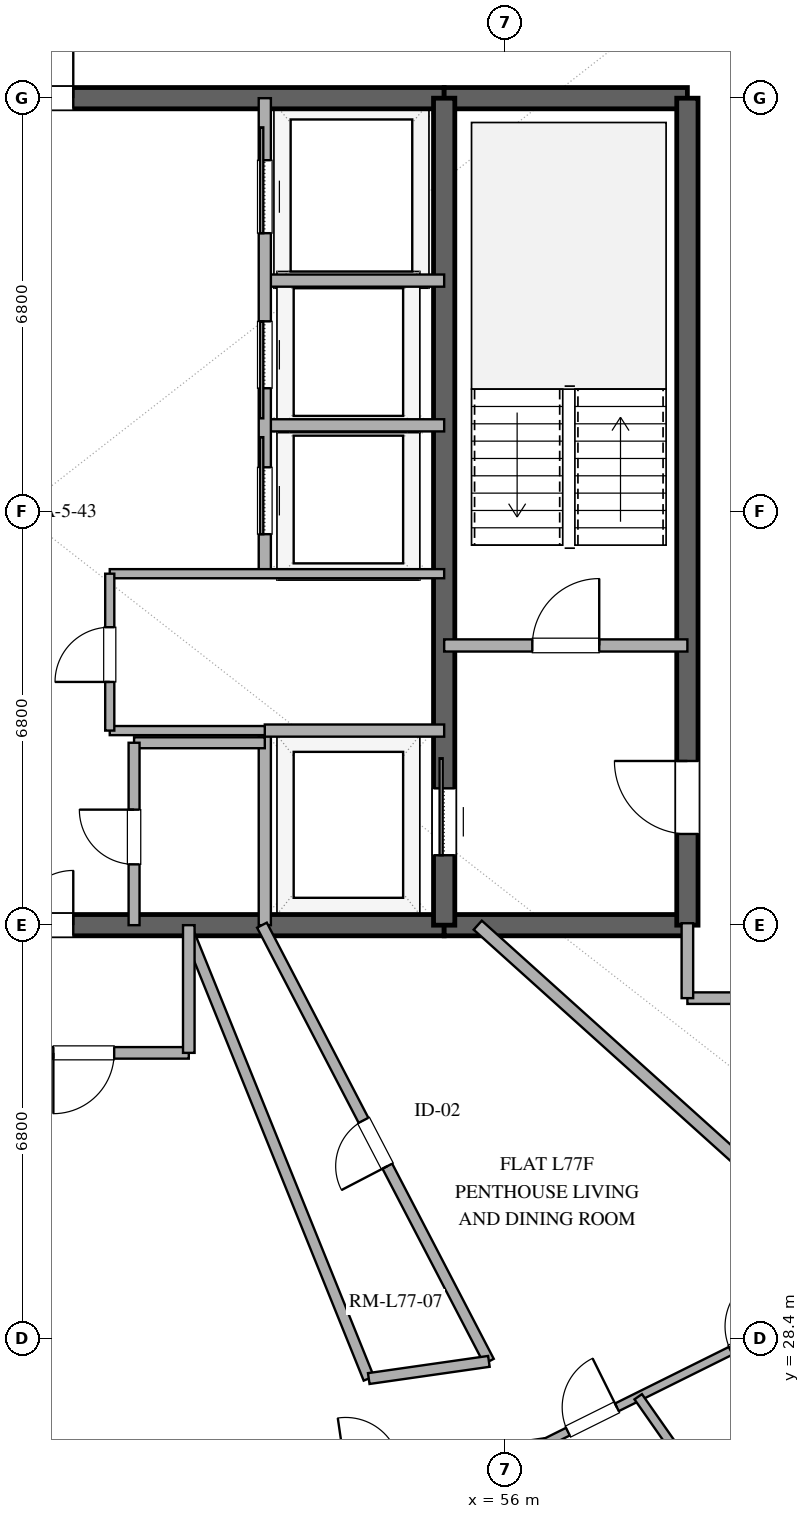
"""IFC4 building model, lengths in metres.
Left out: names, types, materials, properties, quantities, classifications, styles, units other than length and angle.
Written with IfcOpenShell. Run it as: python <this file> out.ifc"""

import sys

from ifc_helpers import new_model, si_unit, direction, frame, frame_2d, origin, place, context, subcontext, project, spatial, rectangle, extrude, element, fill, save


model = new_model("IFC4")
c1 = context("Model", 3, precision=1e-05, world=origin(), true_north=direction((0.0, 1.0)))
c2 = subcontext(c1, "Body", "Model", "MODEL_VIEW")
j1 = project(units=[si_unit("LENGTHUNIT", "METRE"), si_unit("PLANEANGLEUNIT", "RADIAN")], contexts=[c1])
p1 = place(None, origin())
s1 = spatial("IfcSite", under=j1, at=p1, CompositionType="ELEMENT")
p2 = place(p1, origin())
s2 = spatial("IfcBuilding", under=s1, at=p2, CompositionType="ELEMENT")
p3 = place(p2, frame((0.0, 0.0, 298.2)))
s3 = spatial("IfcBuildingStorey", under=s2, at=p3, CompositionType="ELEMENT", Elevation=298.2)
p4 = place(p3, frame((41.0, 35.2, 0.0), z_axis=(0.0, 0.0, 1.0), x_axis=(1.0, 0.0, 0.0)))
e1 = element("IfcWall", 1, at=p4, inside=s3, PredefinedType="SHEAR", context=c2, shape_type="SweptSolid", body=[
    extrude(rectangle(XDim=14.0, YDim=0.35, at=frame_2d((7.0, 0.0))), origin(), (0.0, 0.0, 1.0), 3.37),
])
p5 = place(p4, frame((6.1, 0.0, 0.0)))
e2 = element("IfcOpeningElement", 2, at=p5, cuts=e1, PredefinedType="OPENING", context=c2, shape_type="SweptSolid", body=[
    extrude(rectangle(XDim=1.8, YDim=2.25, at=frame_2d((0.9, 1.125))), frame((0.0, 0.185, 0.0), z_axis=(0.0, -1.0, 0.0), x_axis=(1.0, 0.0, 0.0)), (0.0, 0.0, 1.0), 0.37),
])
p6 = place(p3, frame((55.0, 35.2, 0.0), z_axis=(0.0, 0.0, 1.0), x_axis=(1.0, 0.0, 0.0)))
e3 = element("IfcWall", 3, at=p6, inside=s3, PredefinedType="SHEAR", context=c2, shape_type="SweptSolid", body=[
    extrude(rectangle(XDim=4.0, YDim=0.35, at=frame_2d((2.0, 0.0))), origin(), (0.0, 0.0, 1.0), 3.37),
])
p7 = place(p3, frame((41.0, 48.8, 0.0), z_axis=(0.0, 0.0, 1.0), x_axis=(1.0, 0.0, 0.0)))
e4 = element("IfcWall", 4, at=p7, inside=s3, PredefinedType="SHEAR", context=c2, shape_type="SweptSolid", body=[
    extrude(rectangle(XDim=14.0, YDim=0.35, at=frame_2d((7.0, 0.0))), origin(), (0.0, 0.0, 1.0), 3.37),
])
p8 = place(p7, frame((6.1, 0.0, 0.0)))
e5 = element("IfcOpeningElement", 5, at=p8, cuts=e4, PredefinedType="OPENING", context=c2, shape_type="SweptSolid", body=[
    extrude(rectangle(XDim=1.8, YDim=2.25, at=frame_2d((0.9, 1.125))), frame((0.0, 0.185, 0.0), z_axis=(0.0, -1.0, 0.0), x_axis=(1.0, 0.0, 0.0)), (0.0, 0.0, 1.0), 0.37),
])
p9 = place(p3, frame((55.0, 48.8, 0.0), z_axis=(0.0, 0.0, 1.0), x_axis=(1.0, 0.0, 0.0)))
e6 = element("IfcWall", 6, at=p9, inside=s3, PredefinedType="SHEAR", context=c2, shape_type="SweptSolid", body=[
    extrude(rectangle(XDim=4.0, YDim=0.35, at=frame_2d((2.0, 0.0))), origin(), (0.0, 0.0, 1.0), 3.37),
])
p10 = place(p3, frame((59.0, 35.2, 0.0), z_axis=(0.0, 0.0, 1.0), x_axis=(0.0, 1.0, 0.0)))
e7 = element("IfcWall", 7, at=p10, inside=s3, PredefinedType="SHEAR", context=c2, shape_type="SweptSolid", body=[
    extrude(rectangle(XDim=13.6, YDim=0.35, at=frame_2d((6.8, 0.0))), origin(), (0.0, 0.0, 1.0), 3.37),
])
p11 = place(p10, frame((1.5, 0.0, 0.0)))
e8 = element("IfcOpeningElement", 8, at=p11, cuts=e7, PredefinedType="OPENING", context=c2, shape_type="SweptSolid", body=[
    extrude(rectangle(XDim=1.2, YDim=2.15, at=frame_2d((0.6, 1.075))), frame((0.0, 0.185, 0.0), z_axis=(0.0, -1.0, 0.0), x_axis=(1.0, 0.0, 0.0)), (0.0, 0.0, 1.0), 0.37),
])
p12 = place(p3, frame((55.0, 35.2, 0.0), z_axis=(0.0, 0.0, 1.0), x_axis=(0.0, 1.0, 0.0)))
e9 = element("IfcWall", 9, at=p12, inside=s3, PredefinedType="SHEAR", context=c2, shape_type="SweptSolid", body=[
    extrude(rectangle(XDim=13.6, YDim=0.35, at=frame_2d((6.8, 0.0))), origin(), (0.0, 0.0, 1.0), 3.37),
])
p13 = place(p12, frame((1.15, 0.0, 0.0)))
e10 = element("IfcOpeningElement", 10, at=p13, cuts=e9, PredefinedType="OPENING", context=c2, shape_type="SweptSolid", body=[
    extrude(rectangle(XDim=1.1, YDim=2.2, at=frame_2d((0.55, 1.1))), frame((0.0, 0.185, 0.0), z_axis=(0.0, -1.0, 0.0), x_axis=(1.0, 0.0, 0.0)), (0.0, 0.0, 1.0), 0.37),
])
p14 = place(p3, frame((55.0, 39.8, 0.0), z_axis=(0.0, 0.0, 1.0), x_axis=(1.0, 0.0, 0.0)))
e11 = element("IfcWall", 11, at=p14, inside=s3, PredefinedType="SOLIDWALL", context=c2, shape_type="SweptSolid", body=[
    extrude(rectangle(XDim=4.0, YDim=0.2, at=frame_2d((2.0, 0.0))), origin(), (0.0, 0.0, 1.0), 2.73),
])
p15 = place(p14, frame((1.45, 0.0, 0.0)))
e12 = element("IfcOpeningElement", 12, at=p15, cuts=e11, PredefinedType="OPENING", context=c2, shape_type="SweptSolid", body=[
    extrude(rectangle(XDim=1.1, YDim=2.15, at=frame_2d((0.55, 1.075))), frame((0.0, 0.11, 0.0), z_axis=(0.0, -1.0, 0.0), x_axis=(1.0, 0.0, 0.0)), (0.0, 0.0, 1.0), 0.22),
])
p16 = place(p3, frame((52.05, 35.2, 0.0), z_axis=(0.0, 0.0, 1.0), x_axis=(0.0, 1.0, 0.0)))
e13 = element("IfcWall", 13, at=p16, inside=s3, PredefinedType="SOLIDWALL", context=c2, shape_type="SweptSolid", body=[
    extrude(rectangle(XDim=3.2, YDim=0.2, at=frame_2d((1.6, 0.0))), origin(), (0.0, 0.0, 1.0), 2.73),
])
for number, where, z_axis, x_axis in (
    (14, (52.05, 38.4, 0.0), (0.0, 0.0, 1.0), (1.0, 0.0, 0.0)),
    (15, (52.05, 43.42, 0.0), (0.0, 0.0, 1.0), (1.0, 0.0, 0.0)),
    (16, (52.05, 45.8, 0.0), (0.0, 0.0, 1.0), (1.0, 0.0, 0.0)),
):
    element("IfcWall", number, at=place(p3, frame(where, z_axis=z_axis, x_axis=x_axis)), inside=s3, PredefinedType="SOLIDWALL", context=c2, shape_type="SweptSolid", body=[
        extrude(rectangle(XDim=2.95, YDim=0.2, at=frame_2d((1.475, 0.0))), origin(), (0.0, 0.0, 1.0), 2.73),
    ])
p17 = place(p3, frame((52.05, 40.98, 0.0), z_axis=(0.0, 0.0, 1.0), x_axis=(0.0, 1.0, 0.0)))
e17 = element("IfcWall", 17, at=p17, inside=s3, PredefinedType="SOLIDWALL", context=c2, shape_type="SweptSolid", body=[
    extrude(rectangle(XDim=7.82, YDim=0.2, at=frame_2d((3.91, 0.0))), origin(), (0.0, 0.0, 1.0), 2.73),
])
p18 = place(p17, frame((0.65, 0.0, 0.0)))
e18 = element("IfcOpeningElement", 18, at=p18, cuts=e17, PredefinedType="OPENING", context=c2, shape_type="SweptSolid", body=[
    extrude(rectangle(XDim=1.1, YDim=2.2, at=frame_2d((0.55, 1.1))), frame((0.0, 0.11, 0.0), z_axis=(0.0, -1.0, 0.0), x_axis=(1.0, 0.0, 0.0)), (0.0, 0.0, 1.0), 0.22),
])
p19 = place(p17, frame((3.05, 0.0, 0.0)))
e19 = element("IfcOpeningElement", 19, at=p19, cuts=e17, PredefinedType="OPENING", context=c2, shape_type="SweptSolid", body=[
    extrude(rectangle(XDim=1.1, YDim=2.2, at=frame_2d((0.55, 1.1))), frame((0.0, 0.11, 0.0), z_axis=(0.0, -1.0, 0.0), x_axis=(1.0, 0.0, 0.0)), (0.0, 0.0, 1.0), 0.22),
])
p20 = place(p17, frame((5.6, 0.0, 0.0)))
e20 = element("IfcOpeningElement", 20, at=p20, cuts=e17, PredefinedType="OPENING", context=c2, shape_type="SweptSolid", body=[
    extrude(rectangle(XDim=1.2, YDim=2.2, at=frame_2d((0.6, 1.1))), frame((0.0, 0.11, 0.0), z_axis=(0.0, -1.0, 0.0), x_axis=(1.0, 0.0, 0.0)), (0.0, 0.0, 1.0), 0.22),
])
p21 = place(p3, frame((49.5, 40.98, 0.0), z_axis=(0.0, 0.0, 1.0), x_axis=(1.0, 0.0, 0.0)))
e21 = element("IfcWall", 21, at=p21, inside=s3, PredefinedType="PARTITIONING", context=c2, shape_type="SweptSolid", body=[
    extrude(rectangle(XDim=5.5, YDim=0.15, at=frame_2d((2.75, 0.0))), origin(), (0.0, 0.0, 1.0), 2.73),
])
p22 = place(p3, frame((49.5, 38.4, 0.0), z_axis=(0.0, 0.0, 1.0), x_axis=(1.0, 0.0, 0.0)))
e22 = element("IfcWall", 22, at=p22, inside=s3, PredefinedType="PARTITIONING", context=c2, shape_type="SweptSolid", body=[
    extrude(rectangle(XDim=2.55, YDim=0.15, at=frame_2d((1.275, 0.0))), origin(), (0.0, 0.0, 1.0), 2.73),
])
p23 = place(p3, frame((49.5, 38.4, 0.0), z_axis=(0.0, 0.0, 1.0), x_axis=(0.0, 1.0, 0.0)))
e23 = element("IfcWall", 23, at=p23, inside=s3, PredefinedType="PARTITIONING", context=c2, shape_type="SweptSolid", body=[
    extrude(rectangle(XDim=2.58, YDim=0.15, at=frame_2d((1.29, 0.0))), origin(), (0.0, 0.0, 1.0), 2.73),
])
p24 = place(p23, frame((0.8, 0.0, 0.0)))
e24 = element("IfcOpeningElement", 24, at=p24, cuts=e23, PredefinedType="OPENING", context=c2, shape_type="SweptSolid", body=[
    extrude(rectangle(XDim=0.9, YDim=2.15, at=frame_2d((0.45, 1.075))), frame((0.0, 0.085, 0.0), z_axis=(0.0, -1.0, 0.0), x_axis=(1.0, 0.0, 0.0)), (0.0, 0.0, 1.0), 0.17),
])
p25 = place(p3, frame((49.9, 38.2, 0.0), z_axis=(0.0, 0.0, 1.0), x_axis=(1.0, 0.0, 0.0)))
e25 = element("IfcWall", 25, at=p25, inside=s3, PredefinedType="PLUMBINGWALL", context=c2, shape_type="SweptSolid", body=[
    extrude(rectangle(XDim=2.15, YDim=0.18, at=frame_2d((1.075, 0.0))), origin(), (0.0, 0.0, 1.0), 2.73),
])
p26 = place(p3, frame((49.9, 35.2, 0.0), z_axis=(0.0, 0.0, 1.0), x_axis=(0.0, 1.0, 0.0)))
e26 = element("IfcWall", 26, at=p26, inside=s3, PredefinedType="PLUMBINGWALL", context=c2, shape_type="SweptSolid", body=[
    extrude(rectangle(XDim=3.0, YDim=0.18, at=frame_2d((1.5, 0.0))), origin(), (0.0, 0.0, 1.0), 2.73),
])
p27 = place(p26, frame((1.0, 0.0, 0.0)))
e27 = element("IfcOpeningElement", 27, at=p27, cuts=e26, PredefinedType="OPENING", context=c2, shape_type="SweptSolid", body=[
    extrude(rectangle(XDim=0.9, YDim=2.1, at=frame_2d((0.45, 1.05))), frame((0.0, 0.1, 0.0), z_axis=(0.0, -1.0, 0.0), x_axis=(1.0, 0.0, 0.0)), (0.0, 0.0, 1.0), 0.2),
])
p28 = place(p3, frame((64.656, 27.003, 0.0), z_axis=(0.0, 0.0, 1.0), x_axis=(-0.743146474593, 0.669128774826, 0.0)))
e28 = element("IfcWall", 28, at=p28, inside=s3, PredefinedType="PARTITIONING", context=c2, shape_type="SweptSolid", body=[
    extrude(rectangle(XDim=12.25, YDim=0.2, at=frame_2d((6.125, 0.0))), origin(), (0.0, 0.0, 1.0), 2.73),
])
p29 = place(p3, frame((55.736, 28.027, 0.0), z_axis=(0.0, 0.0, 1.0), x_axis=(-0.461598928477, 0.88708873808, 0.0)))
e29 = element("IfcWall", 29, at=p29, inside=s3, PredefinedType="PLUMBINGWALL", context=c2, shape_type="SweptSolid", body=[
    extrude(rectangle(XDim=8.086, YDim=0.18, at=frame_2d((4.043, 0.0))), origin(), (0.0, 0.0, 1.0), 2.73),
])
p30 = place(p29, frame((3.618, 0.0, 0.0)))
e30 = element("IfcOpeningElement", 30, at=p30, cuts=e29, PredefinedType="OPENING", context=c2, shape_type="SweptSolid", body=[
    extrude(rectangle(XDim=0.85, YDim=2.1, at=frame_2d((0.425, 1.05))), frame((0.0, 0.1, 0.0), z_axis=(0.0, -1.0, 0.0), x_axis=(1.0, 0.0, 0.0)), (0.0, 0.0, 1.0), 0.2),
])
p31 = place(p3, frame((50.8, 35.07, 0.0), z_axis=(0.0, 0.0, 1.0), x_axis=(0.374600990238, -0.927186118378, 0.0)))
e31 = element("IfcWall", 31, at=p31, inside=s3, PredefinedType="PLUMBINGWALL", context=c2, shape_type="SweptSolid", body=[
    extrude(rectangle(XDim=7.901, YDim=0.18, at=frame_2d((3.95, 0.0))), origin(), (0.0, 0.0, 1.0), 2.73),
])
p32 = place(p3, frame((56.655, 26.682, 0.0), z_axis=(0.0, 0.0, 1.0), x_axis=(0.895585218268, 0.444890005304, 0.0)))
e32 = element("IfcWall", 32, at=p32, inside=s3, PredefinedType="PARTITIONING", context=c2, shape_type="SweptSolid", body=[
    extrude(rectangle(XDim=6.014, YDim=0.14, at=frame_2d((3.007, 0.0))), origin(), (0.0, 0.0, 1.0), 2.73),
])
p33 = place(p32, frame((3.415, 0.0, 0.0)))
e33 = element("IfcOpeningElement", 33, at=p33, cuts=e32, PredefinedType="OPENING", context=c2, shape_type="SweptSolid", body=[
    extrude(rectangle(XDim=0.9, YDim=2.1, at=frame_2d((0.45, 1.05))), frame((0.0, 0.08, 0.0), z_axis=(0.0, -1.0, 0.0), x_axis=(1.0, 0.0, 0.0)), (0.0, 0.0, 1.0), 0.16),
])
p34 = place(p32, frame((0.424, 0.0, 0.0)))
e34 = element("IfcOpeningElement", 34, at=p34, cuts=e32, PredefinedType="OPENING", context=c2, shape_type="SweptSolid", body=[
    extrude(rectangle(XDim=0.9, YDim=2.1, at=frame_2d((0.45, 1.05))), frame((0.0, 0.08, 0.0), z_axis=(0.0, -1.0, 0.0), x_axis=(1.0, 0.0, 0.0)), (0.0, 0.0, 1.0), 0.16),
])
p35 = place(p3, frame((50.8, 33.1, 0.0), z_axis=(0.0, 0.0, 1.0), x_axis=(-1.0, 0.0, 0.0)))
e35 = element("IfcWall", 35, at=p35, inside=s3, PredefinedType="PARTITIONING", context=c2, shape_type="SweptSolid", body=[
    extrude(rectangle(XDim=5.6, YDim=0.19, at=frame_2d((2.8, 0.0))), origin(), (0.0, 0.0, 1.0), 2.73),
])
p36 = place(p35, frame((1.227, 0.0, 0.0)))
e36 = element("IfcOpeningElement", 36, at=p36, cuts=e35, PredefinedType="OPENING", context=c2, shape_type="SweptSolid", body=[
    extrude(rectangle(XDim=1.0, YDim=2.2, at=frame_2d((0.5, 1.1))), frame((0.0, 0.105, 0.0), z_axis=(0.0, -1.0, 0.0), x_axis=(1.0, 0.0, 0.0)), (0.0, 0.0, 1.0), 0.21),
])
p37 = place(p35, frame((3.995, 0.0, 0.0)))
e37 = element("IfcOpeningElement", 37, at=p37, cuts=e35, PredefinedType="OPENING", context=c2, shape_type="SweptSolid", body=[
    extrude(rectangle(XDim=1.0, YDim=2.2, at=frame_2d((0.5, 1.1))), frame((0.0, 0.105, 0.0), z_axis=(0.0, -1.0, 0.0), x_axis=(1.0, 0.0, 0.0)), (0.0, 0.0, 1.0), 0.21),
])
p38 = place(p3, frame((52.141, 26.024, 0.0), z_axis=(0.0, 0.0, 1.0), x_axis=(0.989534254842, 0.144298158322, 0.0)))
e38 = element("IfcWall", 38, at=p38, inside=s3, PredefinedType="PLUMBINGWALL", context=c2, shape_type="SweptSolid", body=[
    extrude(rectangle(XDim=4.562, YDim=0.16, at=frame_2d((2.281, 0.0))), origin(), (0.0, 0.0, 1.0), 2.73),
])
p39 = place(p38, frame((1.252, 0.0, 0.0)))
e39 = element("IfcOpeningElement", 39, at=p39, cuts=e38, PredefinedType="OPENING", context=c2, shape_type="SweptSolid", body=[
    extrude(rectangle(XDim=0.9, YDim=2.1, at=frame_2d((0.45, 1.05))), frame((0.0, 0.09, 0.0), z_axis=(0.0, -1.0, 0.0), x_axis=(1.0, 0.0, 0.0)), (0.0, 0.0, 1.0), 0.18),
])
p40 = place(p3, frame((58.191, 27.445, 0.0), z_axis=(0.0, 0.0, 1.0), x_axis=(0.573559302344, -0.819164041383, 0.0)))
e40 = element("IfcWall", 40, at=p40, inside=s3, PredefinedType="PARTITIONING", context=c2, shape_type="SweptSolid", body=[
    extrude(rectangle(XDim=3.38, YDim=0.15, at=frame_2d((1.69, 0.0))), origin(), (0.0, 0.0, 1.0), 2.73),
])
p41 = place(p3, frame((61.2, 34.0, 0.0), z_axis=(0.0, 0.0, 1.0), x_axis=(-1.0, 0.0, 0.0)))
e41 = element("IfcWall", 41, at=p41, inside=s3, PredefinedType="PARTITIONING", context=c2, shape_type="SweptSolid", body=[
    extrude(rectangle(XDim=2.2, YDim=0.19, at=frame_2d((1.1, 0.0))), origin(), (0.0, 0.0, 1.0), 2.73),
])
p42 = place(p3, frame((50.8, 35.2, 0.0), z_axis=(0.0, 0.0, 1.0), x_axis=(0.0, -1.0, 0.0)))
e42 = element("IfcWall", 42, at=p42, inside=s3, PredefinedType="PARTITIONING", context=c2, shape_type="SweptSolid", body=[
    extrude(rectangle(XDim=2.1, YDim=0.19, at=frame_2d((1.05, 0.0))), origin(), (0.0, 0.0, 1.0), 2.73),
])
p43 = place(p3, frame((53.76, 27.744, 0.0), z_axis=(0.0, 0.0, 1.0), x_axis=(0.989917666011, 0.141643970992, 0.0)))
e43 = element("IfcWall", 43, at=p43, inside=s3, PredefinedType="PLUMBINGWALL", context=c2, shape_type="SweptSolid", body=[
    extrude(rectangle(XDim=1.996, YDim=0.18, at=frame_2d((0.998, 0.0))), origin(), (0.0, 0.0, 1.0), 2.73),
])
p44 = place(p3, frame((59.0, 34.0, 0.0), z_axis=(0.0, 0.0, 1.0), x_axis=(0.0, 1.0, 0.0)))
e44 = element("IfcWall", 44, at=p44, inside=s3, PredefinedType="PARTITIONING", context=c2, shape_type="SweptSolid", body=[
    extrude(rectangle(XDim=1.232, YDim=0.19, at=frame_2d((0.616, 0.0))), origin(), (0.0, 0.0, 1.0), 2.73),
])
p45 = place(p13, origin())
e45 = element("IfcDoor", 45, at=p45, inside=s3, OperationType="SLIDING_TO_RIGHT", PredefinedType="DOOR", context=c2, shape_type="SweptSolid", body=[
    extrude(rectangle(XDim=1.1, YDim=2.2, at=frame_2d((0.55, 1.1))), frame((0.0, 0.025, 0.0), z_axis=(0.0, -1.0, 0.0), x_axis=(1.0, 0.0, 0.0)), (0.0, 0.0, 1.0), 0.05),
])
fill(e10, e45)
p46 = place(p11, origin())
e46 = element("IfcDoor", 46, at=p46, inside=s3, OperationType="SINGLE_SWING_RIGHT", PredefinedType="DOOR", context=c2, shape_type="SweptSolid", body=[
    extrude(rectangle(XDim=1.2, YDim=2.15, at=frame_2d((0.6, 1.075))), frame((0.0, 0.025, 0.0), z_axis=(0.0, -1.0, 0.0), x_axis=(1.0, 0.0, 0.0)), (0.0, 0.0, 1.0), 0.05),
])
fill(e8, e46)
p47 = place(p5, origin())
e47 = element("IfcDoor", 47, at=p47, inside=s3, OperationType="DOUBLE_DOOR_SINGLE_SWING", PredefinedType="DOOR", context=c2, shape_type="SweptSolid", body=[
    extrude(rectangle(XDim=1.8, YDim=2.25, at=frame_2d((0.9, 1.125))), frame((0.0, 0.025, 0.0), z_axis=(0.0, -1.0, 0.0), x_axis=(1.0, 0.0, 0.0)), (0.0, 0.0, 1.0), 0.05),
])
fill(e2, e47)
p48 = place(p8, origin())
e48 = element("IfcDoor", 48, at=p48, inside=s3, OperationType="DOUBLE_DOOR_SINGLE_SWING", PredefinedType="DOOR", context=c2, shape_type="SweptSolid", body=[
    extrude(rectangle(XDim=1.8, YDim=2.25, at=frame_2d((0.9, 1.125))), frame((0.0, 0.025, 0.0), z_axis=(0.0, -1.0, 0.0), x_axis=(1.0, 0.0, 0.0)), (0.0, 0.0, 1.0), 0.05),
])
fill(e5, e48)
p49 = place(p15, origin())
e49 = element("IfcDoor", 49, at=p49, inside=s3, OperationType="SINGLE_SWING_RIGHT", PredefinedType="DOOR", context=c2, shape_type="SweptSolid", body=[
    extrude(rectangle(XDim=1.1, YDim=2.15, at=frame_2d((0.55, 1.075))), frame((0.0, 0.025, 0.0), z_axis=(0.0, -1.0, 0.0), x_axis=(1.0, 0.0, 0.0)), (0.0, 0.0, 1.0), 0.05),
])
fill(e12, e49)
p50 = place(p18, origin())
e50 = element("IfcDoor", 50, at=p50, inside=s3, OperationType="SLIDING_TO_RIGHT", PredefinedType="DOOR", context=c2, shape_type="SweptSolid", body=[
    extrude(rectangle(XDim=1.1, YDim=2.2, at=frame_2d((0.55, 1.1))), frame((0.0, 0.025, 0.0), z_axis=(0.0, -1.0, 0.0), x_axis=(1.0, 0.0, 0.0)), (0.0, 0.0, 1.0), 0.05),
])
fill(e18, e50)
p51 = place(p19, origin())
e51 = element("IfcDoor", 51, at=p51, inside=s3, OperationType="SLIDING_TO_LEFT", PredefinedType="DOOR", context=c2, shape_type="SweptSolid", body=[
    extrude(rectangle(XDim=1.1, YDim=2.2, at=frame_2d((0.55, 1.1))), frame((0.0, 0.025, 0.0), z_axis=(0.0, -1.0, 0.0), x_axis=(1.0, 0.0, 0.0)), (0.0, 0.0, 1.0), 0.05),
])
fill(e19, e51)
p52 = place(p20, origin())
e52 = element("IfcDoor", 52, at=p52, inside=s3, OperationType="SLIDING_TO_RIGHT", PredefinedType="DOOR", context=c2, shape_type="SweptSolid", body=[
    extrude(rectangle(XDim=1.2, YDim=2.2, at=frame_2d((0.6, 1.1))), frame((0.0, 0.025, 0.0), z_axis=(0.0, -1.0, 0.0), x_axis=(1.0, 0.0, 0.0)), (0.0, 0.0, 1.0), 0.05),
])
fill(e20, e52)
p53 = place(p24, origin())
e53 = element("IfcDoor", 53, at=p53, inside=s3, OperationType="SINGLE_SWING_LEFT", PredefinedType="DOOR", context=c2, shape_type="SweptSolid", body=[
    extrude(rectangle(XDim=0.9, YDim=2.15, at=frame_2d((0.45, 1.075))), frame((0.0, 0.025, 0.0), z_axis=(0.0, -1.0, 0.0), x_axis=(1.0, 0.0, 0.0)), (0.0, 0.0, 1.0), 0.05),
])
fill(e24, e53)
p54 = place(p27, origin())
e54 = element("IfcDoor", 54, at=p54, inside=s3, OperationType="SINGLE_SWING_RIGHT", PredefinedType="DOOR", context=c2, shape_type="SweptSolid", body=[
    extrude(rectangle(XDim=0.9, YDim=2.1, at=frame_2d((0.45, 1.05))), frame((0.0, 0.025, 0.0), z_axis=(0.0, -1.0, 0.0), x_axis=(1.0, 0.0, 0.0)), (0.0, 0.0, 1.0), 0.05),
])
fill(e27, e54)
p55 = place(p30, origin())
e55 = element("IfcDoor", 55, at=p55, inside=s3, OperationType="SINGLE_SWING_LEFT", PredefinedType="DOOR", context=c2, shape_type="SweptSolid", body=[
    extrude(rectangle(XDim=0.85, YDim=2.1, at=frame_2d((0.425, 1.05))), frame((0.0, 0.025, 0.0), z_axis=(0.0, -1.0, 0.0), x_axis=(1.0, 0.0, 0.0)), (0.0, 0.0, 1.0), 0.05),
])
fill(e30, e55)
p56 = place(p34, origin())
e56 = element("IfcDoor", 56, at=p56, inside=s3, OperationType="SINGLE_SWING_RIGHT", PredefinedType="DOOR", context=c2, shape_type="SweptSolid", body=[
    extrude(rectangle(XDim=0.9, YDim=2.1, at=frame_2d((0.45, 1.05))), frame((0.0, 0.025, 0.0), z_axis=(0.0, -1.0, 0.0), x_axis=(1.0, 0.0, 0.0)), (0.0, 0.0, 1.0), 0.05),
])
fill(e34, e56)
p57 = place(p36, origin())
e57 = element("IfcDoor", 57, at=p57, inside=s3, OperationType="SINGLE_SWING_RIGHT", PredefinedType="DOOR", context=c2, shape_type="SweptSolid", body=[
    extrude(rectangle(XDim=1.0, YDim=2.2, at=frame_2d((0.5, 1.1))), frame((0.0, 0.025, 0.0), z_axis=(0.0, -1.0, 0.0), x_axis=(1.0, 0.0, 0.0)), (0.0, 0.0, 1.0), 0.05),
])
fill(e36, e57)
save(model, sys.argv[1])
